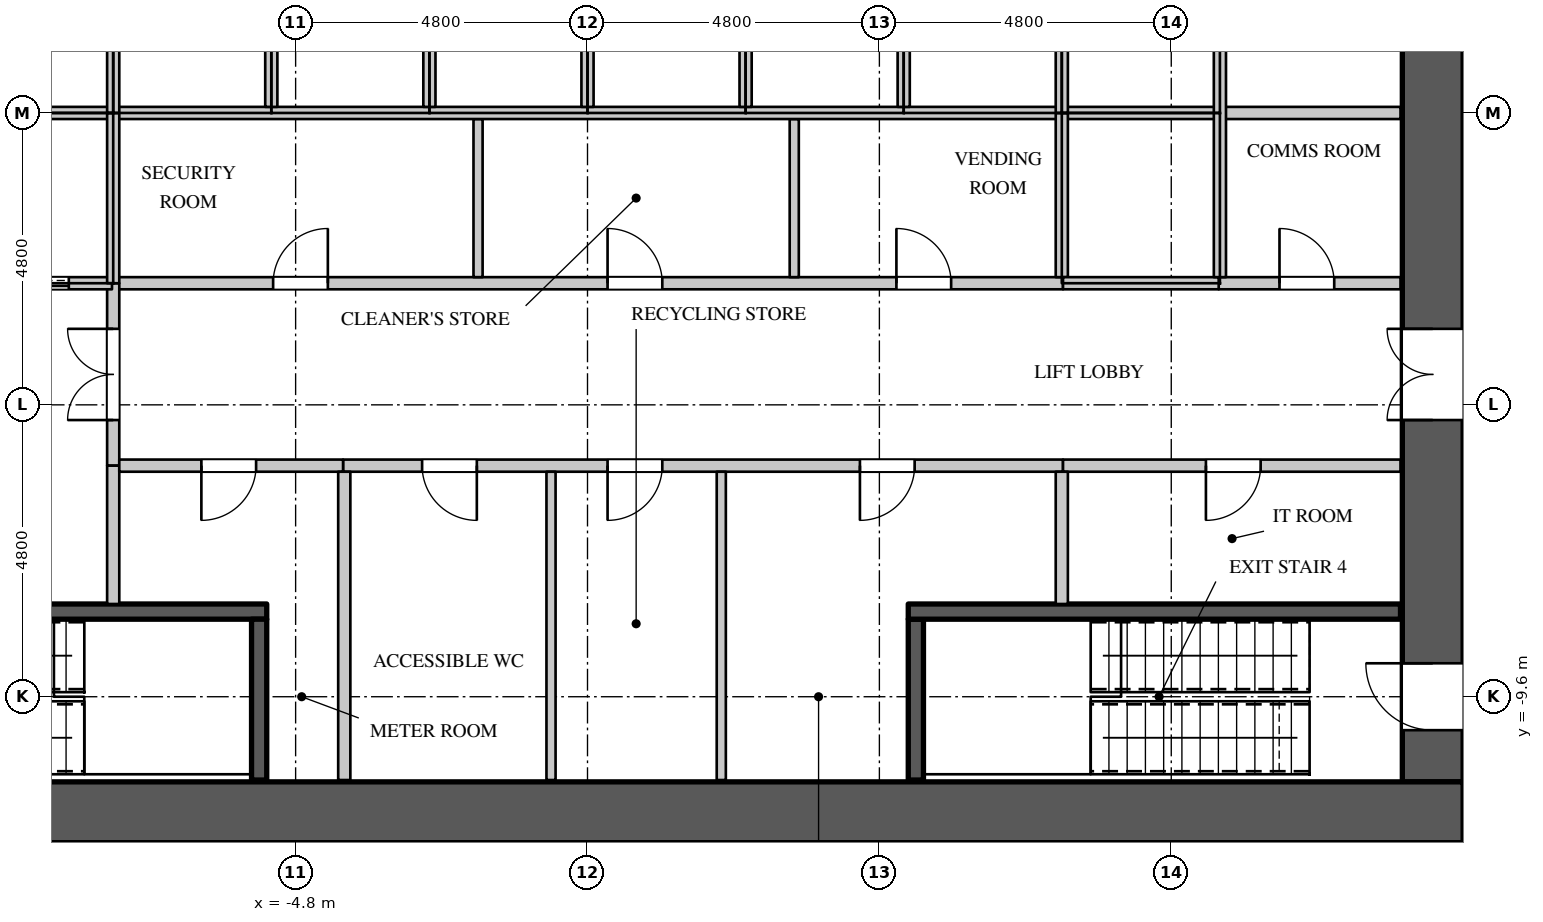
"""IFC4 building model, lengths in metres.
Left out: names, types, materials, properties, quantities, classifications, styles, units other than length and angle.
Written with IfcOpenShell. Run it as: python <this file> out.ifc"""

import sys

from ifc_helpers import new_model, si_unit, direction, frame, frame_2d, origin, place, context, subcontext, project, spatial, rectangle, extrude, element, fill, save


model = new_model("IFC4")
c1 = context("Model", 3, precision=1e-05, world=origin(), true_north=direction((0.0, 1.0)))
c2 = subcontext(c1, "Body", "Model", "MODEL_VIEW")
j1 = project(units=[si_unit("LENGTHUNIT", "METRE"), si_unit("PLANEANGLEUNIT", "RADIAN")], contexts=[c1])
p1 = place(None, origin())
s1 = spatial("IfcSite", under=j1, at=p1, CompositionType="ELEMENT")
p2 = place(p1, origin())
s2 = spatial("IfcBuilding", under=s1, at=p2, CompositionType="ELEMENT")
p3 = place(p2, frame((0.0, 0.0, 50.7)))
s3 = spatial("IfcBuildingStorey", under=s2, at=p3, CompositionType="ELEMENT", Elevation=50.7)
p4 = place(p3, frame((-14.4, -11.5, 0.0), z_axis=(0.0, 0.0, 1.0), x_axis=(1.0, 0.0, 0.0)))
e1 = element("IfcWall", 1, at=p4, inside=s3, PredefinedType="SHEAR", context=c2, shape_type="SweptSolid", body=[
    extrude(rectangle(XDim=28.8, YDim=1.0, at=frame_2d((14.4, 0.0))), origin(), (0.0, 0.0, 1.0), 4.2),
])
p5 = place(p3, frame((13.9, -11.0, 0.0), z_axis=(0.0, 0.0, 1.0), x_axis=(0.0, 1.0, 0.0)))
e2 = element("IfcWall", 2, at=p5, inside=s3, PredefinedType="SHEAR", context=c2, shape_type="SweptSolid", body=[
    extrude(rectangle(XDim=22.0, YDim=1.0, at=frame_2d((11.0, 0.0))), origin(), (0.0, 0.0, 1.0), 4.2),
])
p6 = place(p5, frame((20.05, 0.0, 0.0)))
e3 = element("IfcOpeningElement", 3, at=p6, cuts=e2, PredefinedType="OPENING", context=c2, shape_type="SweptSolid", body=[
    extrude(rectangle(XDim=1.1, YDim=2.2, at=frame_2d((0.55, 1.1))), frame((0.0, 0.51, 0.0), z_axis=(0.0, -1.0, 0.0), x_axis=(1.0, 0.0, 0.0)), (0.0, 0.0, 1.0), 1.02),
])
p7 = place(p5, frame((0.85, 0.0, 0.0)))
e4 = element("IfcOpeningElement", 4, at=p7, cuts=e2, PredefinedType="OPENING", context=c2, shape_type="SweptSolid", body=[
    extrude(rectangle(XDim=1.1, YDim=2.2, at=frame_2d((0.55, 1.1))), frame((0.0, 0.51, 0.0), z_axis=(0.0, -1.0, 0.0), x_axis=(1.0, 0.0, 0.0)), (0.0, 0.0, 1.0), 1.02),
])
p8 = place(p5, frame((14.55, 0.0, 0.0)))
e5 = element("IfcOpeningElement", 5, at=p8, cuts=e2, PredefinedType="OPENING", context=c2, shape_type="SweptSolid", body=[
    extrude(rectangle(XDim=1.5, YDim=2.4, at=frame_2d((0.75, 1.2))), frame((0.0, 0.51, 0.0), z_axis=(0.0, -1.0, 0.0), x_axis=(1.0, 0.0, 0.0)), (0.0, 0.0, 1.0), 1.02),
])
p9 = place(p5, frame((5.95, 0.0, 0.0)))
e6 = element("IfcOpeningElement", 6, at=p9, cuts=e2, PredefinedType="OPENING", context=c2, shape_type="SweptSolid", body=[
    extrude(rectangle(XDim=1.5, YDim=2.4, at=frame_2d((0.75, 1.2))), frame((0.0, 0.51, 0.0), z_axis=(0.0, -1.0, 0.0), x_axis=(1.0, 0.0, 0.0)), (0.0, 0.0, 1.0), 1.02),
])
p10 = place(p3, frame((-7.82, -2.8, 0.0), z_axis=(0.0, 0.0, 1.0), x_axis=(1.0, 0.0, 0.0)))
e7 = element("IfcWall", 7, at=p10, inside=s3, PredefinedType="PARTITIONING", context=c2, shape_type="SweptSolid", body=[
    extrude(rectangle(XDim=15.64, YDim=0.2, at=frame_2d((7.82, 0.0))), origin(), (0.0, 0.0, 1.0), 3.95),
])
p11 = place(p10, frame((2.65, 0.0, 0.0)))
e8 = element("IfcOpeningElement", 8, at=p11, cuts=e7, PredefinedType="OPENING", context=c2, shape_type="SweptSolid", body=[
    extrude(rectangle(XDim=0.9, YDim=2.2, at=frame_2d((0.45, 1.1))), frame((0.0, 0.11, 0.0), z_axis=(0.0, -1.0, 0.0), x_axis=(1.0, 0.0, 0.0)), (0.0, 0.0, 1.0), 0.22),
])
p12 = place(p10, frame((8.15, 0.0, 0.0)))
e9 = element("IfcOpeningElement", 9, at=p12, cuts=e7, PredefinedType="OPENING", context=c2, shape_type="SweptSolid", body=[
    extrude(rectangle(XDim=0.9, YDim=2.2, at=frame_2d((0.45, 1.1))), frame((0.0, 0.11, 0.0), z_axis=(0.0, -1.0, 0.0), x_axis=(1.0, 0.0, 0.0)), (0.0, 0.0, 1.0), 0.22),
])
p13 = place(p10, frame((12.9, 0.0, 0.0)))
e10 = element("IfcOpeningElement", 10, at=p13, cuts=e7, PredefinedType="OPENING", context=c2, shape_type="SweptSolid", body=[
    extrude(rectangle(XDim=0.9, YDim=2.2, at=frame_2d((0.45, 1.1))), frame((0.0, 0.11, 0.0), z_axis=(0.0, -1.0, 0.0), x_axis=(1.0, 0.0, 0.0)), (0.0, 0.0, 1.0), 0.22),
])
p14 = place(p3, frame((-7.8, -5.8, 0.0), z_axis=(0.0, 0.0, 1.0), x_axis=(0.0, 1.0, 0.0)))
e11 = element("IfcWall", 11, at=p14, inside=s3, PredefinedType="PARTITIONING", context=c2, shape_type="SweptSolid", body=[
    extrude(rectangle(XDim=3.0, YDim=0.2, at=frame_2d((1.5, 0.0))), origin(), (0.0, 0.0, 1.0), 3.95),
])
p15 = place(p14, frame((0.75, 0.0, 0.0)))
e12 = element("IfcOpeningElement", 12, at=p15, cuts=e11, PredefinedType="OPENING", context=c2, shape_type="SweptSolid", body=[
    extrude(rectangle(XDim=1.5, YDim=2.4, at=frame_2d((0.75, 1.2))), frame((0.0, 0.11, 0.0), z_axis=(0.0, -1.0, 0.0), x_axis=(1.0, 0.0, 0.0)), (0.0, 0.0, 1.0), 0.22),
])
p16 = place(p3, frame((-4.02, -5.8, 0.0), z_axis=(0.0, 0.0, 1.0), x_axis=(1.0, 0.0, 0.0)))
e13 = element("IfcWall", 13, at=p16, inside=s3, PredefinedType="PARTITIONING", context=c2, shape_type="SweptSolid", body=[
    extrude(rectangle(XDim=11.84, YDim=0.2, at=frame_2d((5.92, 0.0))), origin(), (0.0, 0.0, 1.0), 3.95),
])
p17 = place(p16, frame((1.3, 0.0, 0.0)))
e14 = element("IfcOpeningElement", 14, at=p17, cuts=e13, PredefinedType="OPENING", context=c2, shape_type="SweptSolid", body=[
    extrude(rectangle(XDim=0.9, YDim=2.2, at=frame_2d((0.45, 1.1))), frame((0.0, 0.11, 0.0), z_axis=(0.0, -1.0, 0.0), x_axis=(1.0, 0.0, 0.0)), (0.0, 0.0, 1.0), 0.22),
])
p18 = place(p16, frame((4.35, 0.0, 0.0)))
e15 = element("IfcOpeningElement", 15, at=p18, cuts=e13, PredefinedType="OPENING", context=c2, shape_type="SweptSolid", body=[
    extrude(rectangle(XDim=0.9, YDim=2.2, at=frame_2d((0.45, 1.1))), frame((0.0, 0.11, 0.0), z_axis=(0.0, -1.0, 0.0), x_axis=(1.0, 0.0, 0.0)), (0.0, 0.0, 1.0), 0.22),
])
p19 = place(p16, frame((8.5, 0.0, 0.0)))
e16 = element("IfcOpeningElement", 16, at=p19, cuts=e13, PredefinedType="OPENING", context=c2, shape_type="SweptSolid", body=[
    extrude(rectangle(XDim=0.9, YDim=2.2, at=frame_2d((0.45, 1.1))), frame((0.0, 0.11, 0.0), z_axis=(0.0, -1.0, 0.0), x_axis=(1.0, 0.0, 0.0)), (0.0, 0.0, 1.0), 0.22),
])
p20 = place(p3, frame((-1.8, -2.7, 0.0), z_axis=(0.0, 0.0, 1.0), x_axis=(0.0, 1.0, 0.0)))
e17 = element("IfcWall", 17, at=p20, inside=s3, PredefinedType="PARTITIONING", context=c2, shape_type="SweptSolid", body=[
    extrude(rectangle(XDim=2.6, YDim=0.15, at=frame_2d((1.3, 0.0))), origin(), (0.0, 0.0, 1.0), 3.95),
])
for number, where, z_axis, x_axis in (
    (18, (-0.6, -10.97, 0.0), (0.0, 0.0, 1.0), (0.0, 1.0, 0.0)),
    (19, (2.2, -10.97, 0.0), (0.0, 0.0, 1.0), (0.0, 1.0, 0.0)),
):
    element("IfcWall", number, at=place(p3, frame(where, z_axis=z_axis, x_axis=x_axis)), inside=s3, PredefinedType="PARTITIONING", context=c2, shape_type="SweptSolid", body=[
        extrude(rectangle(XDim=5.07, YDim=0.15, at=frame_2d((2.535, 0.0))), origin(), (0.0, 0.0, 1.0), 3.95),
    ])
p21 = place(p3, frame((3.4, -2.7, 0.0), z_axis=(0.0, 0.0, 1.0), x_axis=(0.0, 1.0, 0.0)))
e20 = element("IfcWall", 20, at=p21, inside=s3, PredefinedType="PARTITIONING", context=c2, shape_type="SweptSolid", body=[
    extrude(rectangle(XDim=2.6, YDim=0.15, at=frame_2d((1.3, 0.0))), origin(), (0.0, 0.0, 1.0), 3.95),
])
p22 = place(p3, frame((-7.8, -8.075, 0.0), z_axis=(0.0, 0.0, 1.0), x_axis=(0.0, 1.0, 0.0)))
e21 = element("IfcWall", 21, at=p22, inside=s3, PredefinedType="PARTITIONING", context=c2, shape_type="SweptSolid", body=[
    extrude(rectangle(XDim=2.275, YDim=0.2, at=frame_2d((1.137, 0.0))), origin(), (0.0, 0.0, 1.0), 3.95),
])
p23 = place(p3, frame((-7.7, -5.8, 0.0), z_axis=(0.0, 0.0, 1.0), x_axis=(1.0, 0.0, 0.0)))
e22 = element("IfcWall", 22, at=p23, inside=s3, PredefinedType="PARTITIONING", context=c2, shape_type="SweptSolid", body=[
    extrude(rectangle(XDim=3.68, YDim=0.2, at=frame_2d((1.84, 0.0))), origin(), (0.0, 0.0, 1.0), 3.95),
])
p24 = place(p23, frame((1.35, 0.0, 0.0)))
e23 = element("IfcOpeningElement", 23, at=p24, cuts=e22, PredefinedType="OPENING", context=c2, shape_type="SweptSolid", body=[
    extrude(rectangle(XDim=0.9, YDim=2.2, at=frame_2d((0.45, 1.1))), frame((0.0, 0.11, 0.0), z_axis=(0.0, -1.0, 0.0), x_axis=(1.0, 0.0, 0.0)), (0.0, 0.0, 1.0), 0.22),
])
p25 = place(p3, frame((-4.0, -10.97, 0.0), z_axis=(0.0, 0.0, 1.0), x_axis=(0.0, 1.0, 0.0)))
e24 = element("IfcWall", 24, at=p25, inside=s3, PredefinedType="PARTITIONING", context=c2, shape_type="SweptSolid", body=[
    extrude(rectangle(XDim=5.07, YDim=0.2, at=frame_2d((2.535, 0.0))), origin(), (0.0, 0.0, 1.0), 3.95),
])
p26 = place(p3, frame((7.82, -5.8, 0.0), z_axis=(0.0, 0.0, 1.0), x_axis=(1.0, 0.0, 0.0)))
e25 = element("IfcWall", 25, at=p26, inside=s3, PredefinedType="PARTITIONING", context=c2, shape_type="SweptSolid", body=[
    extrude(rectangle(XDim=5.55, YDim=0.2, at=frame_2d((2.775, 0.0))), origin(), (0.0, 0.0, 1.0), 3.95),
])
p27 = place(p26, frame((2.35, 0.0, 0.0)))
e26 = element("IfcOpeningElement", 26, at=p27, cuts=e25, PredefinedType="OPENING", context=c2, shape_type="SweptSolid", body=[
    extrude(rectangle(XDim=0.9, YDim=2.2, at=frame_2d((0.45, 1.1))), frame((0.0, 0.11, 0.0), z_axis=(0.0, -1.0, 0.0), x_axis=(1.0, 0.0, 0.0)), (0.0, 0.0, 1.0), 0.22),
])
p28 = place(p3, frame((7.8, -8.075, 0.0), z_axis=(0.0, 0.0, 1.0), x_axis=(0.0, 1.0, 0.0)))
e27 = element("IfcWall", 27, at=p28, inside=s3, PredefinedType="PARTITIONING", context=c2, shape_type="SweptSolid", body=[
    extrude(rectangle(XDim=2.175, YDim=0.2, at=frame_2d((1.087, 0.0))), origin(), (0.0, 0.0, 1.0), 3.95),
])
p29 = place(p3, frame((10.38, -2.8, 0.0), z_axis=(0.0, 0.0, 1.0), x_axis=(1.0, 0.0, 0.0)))
e28 = element("IfcWall", 28, at=p29, inside=s3, PredefinedType="PARTITIONING", context=c2, shape_type="SweptSolid", body=[
    extrude(rectangle(XDim=2.99, YDim=0.2, at=frame_2d((1.495, 0.0))), origin(), (0.0, 0.0, 1.0), 3.95),
])
p30 = place(p29, frame((1.0, 0.0, 0.0)))
e29 = element("IfcOpeningElement", 29, at=p30, cuts=e28, PredefinedType="OPENING", context=c2, shape_type="SweptSolid", body=[
    extrude(rectangle(XDim=0.9, YDim=2.2, at=frame_2d((0.45, 1.1))), frame((0.0, 0.11, 0.0), z_axis=(0.0, -1.0, 0.0), x_axis=(1.0, 0.0, 0.0)), (0.0, 0.0, 1.0), 0.22),
])
p31 = place(p3, frame((10.4, 0.0, 0.0), z_axis=(0.0, 0.0, 1.0), x_axis=(1.0, 0.0, 0.0)))
e30 = element("IfcWall", 30, at=p31, inside=s3, PredefinedType="PARTITIONING", context=c2, shape_type="SweptSolid", body=[
    extrude(rectangle(XDim=2.97, YDim=0.2, at=frame_2d((1.485, 0.0))), origin(), (0.0, 0.0, 1.0), 3.95),
])
p32 = place(p3, frame((-13.37, 0.0, 0.0), z_axis=(0.0, 0.0, 1.0), x_axis=(1.0, 0.0, 0.0)))
e31 = element("IfcWall", 31, at=p32, inside=s3, PredefinedType="PARTITIONING", context=c2, shape_type="SweptSolid", body=[
    extrude(rectangle(XDim=23.77, YDim=0.2, at=frame_2d((11.885, 0.0))), origin(), (0.0, 0.0, 1.0), 3.95),
])
p33 = place(p3, frame((-10.38, -2.8, 0.0), z_axis=(0.0, 0.0, 1.0), x_axis=(1.0, 0.0, 0.0)))
e32 = element("IfcWall", 32, at=p33, inside=s3, PredefinedType="PARTITIONING", context=c2, shape_type="SweptSolid", body=[
    extrude(rectangle(XDim=2.56, YDim=0.2, at=frame_2d((1.28, 0.0))), origin(), (0.0, 0.0, 1.0), 3.95),
])
p34 = place(p33, frame((0.75, 0.0, 0.0)))
e33 = element("IfcOpeningElement", 33, at=p34, cuts=e32, PredefinedType="OPENING", context=c2, shape_type="SweptSolid", body=[
    extrude(rectangle(XDim=1.1, YDim=2.2, at=frame_2d((0.55, 1.1))), frame((0.0, 0.11, 0.0), z_axis=(0.0, -1.0, 0.0), x_axis=(1.0, 0.0, 0.0)), (0.0, 0.0, 1.0), 0.22),
])
for number, where, z_axis, x_axis in (
    (34, (-7.8, -2.8, 0.0), (0.0, 0.0, 1.0), (0.0, 1.0, 0.0)),
    (35, (-7.8, 0.0, 0.0), (0.0, 0.0, 1.0), (0.0, 1.0, 0.0)),
):
    element("IfcWall", number, at=place(p3, frame(where, z_axis=z_axis, x_axis=x_axis)), inside=s3, PredefinedType="PARTITIONING", context=c2, shape_type="SweptSolid", body=[
        extrude(rectangle(XDim=2.8, YDim=0.2, at=frame_2d((1.4, 0.0))), origin(), (0.0, 0.0, 1.0), 3.95),
    ])
for number, where, z_axis, x_axis in (
    (36, (-5.2, 0.1, 0.0), (0.0, 0.0, 1.0), (0.0, 1.0, 0.0)),
    (37, (-2.6, 0.1, 0.0), (0.0, 0.0, 1.0), (0.0, 1.0, 0.0)),
    (38, (0.0, 0.1, 0.0), (0.0, 0.0, 1.0), (0.0, 1.0, 0.0)),
    (39, (2.6, 0.1, 0.0), (0.0, 0.0, 1.0), (0.0, 1.0, 0.0)),
    (40, (5.2, 0.1, 0.0), (0.0, 0.0, 1.0), (0.0, 1.0, 0.0)),
):
    element("IfcWall", number, at=place(p3, frame(where, z_axis=z_axis, x_axis=x_axis)), inside=s3, PredefinedType="PARTITIONING", context=c2, shape_type="SweptSolid", body=[
        extrude(rectangle(XDim=2.6, YDim=0.2, at=frame_2d((1.3, 0.0))), origin(), (0.0, 0.0, 1.0), 3.95),
    ])
p35 = place(p3, frame((7.8, -2.7, 0.0), z_axis=(0.0, 0.0, 1.0), x_axis=(0.0, 1.0, 0.0)))
e41 = element("IfcWall", 41, at=p35, inside=s3, PredefinedType="PARTITIONING", context=c2, shape_type="SweptSolid", body=[
    extrude(rectangle(XDim=2.7, YDim=0.2, at=frame_2d((1.35, 0.0))), origin(), (0.0, 0.0, 1.0), 3.95),
])
p36 = place(p3, frame((7.82, -2.8, 0.0), z_axis=(0.0, 0.0, 1.0), x_axis=(1.0, 0.0, 0.0)))
e42 = element("IfcWall", 42, at=p36, inside=s3, PredefinedType="PARTITIONING", context=c2, shape_type="SweptSolid", body=[
    extrude(rectangle(XDim=2.56, YDim=0.2, at=frame_2d((1.28, 0.0))), origin(), (0.0, 0.0, 1.0), 3.95),
])
p37 = place(p3, frame((7.8, 0.0, 0.0), z_axis=(0.0, 0.0, 1.0), x_axis=(0.0, 1.0, 0.0)))
e43 = element("IfcWall", 43, at=p37, inside=s3, PredefinedType="PARTITIONING", context=c2, shape_type="SweptSolid", body=[
    extrude(rectangle(XDim=2.7, YDim=0.2, at=frame_2d((1.35, 0.0))), origin(), (0.0, 0.0, 1.0), 3.95),
])
p38 = place(p3, frame((10.4, -2.7, 0.0), z_axis=(0.0, 0.0, 1.0), x_axis=(0.0, 1.0, 0.0)))
e44 = element("IfcWall", 44, at=p38, inside=s3, PredefinedType="PARTITIONING", context=c2, shape_type="SweptSolid", body=[
    extrude(rectangle(XDim=5.4, YDim=0.2, at=frame_2d((2.7, 0.0))), origin(), (0.0, 0.0, 1.0), 3.95),
])
p39 = place(p3, frame((-13.37, -8.2, 0.0), z_axis=(0.0, 0.0, 1.0), x_axis=(1.0, 0.0, 0.0)))
e45 = element("IfcWall", 45, at=p39, inside=s3, PredefinedType="SHEAR", context=c2, shape_type="SweptSolid", body=[
    extrude(rectangle(XDim=8.095, YDim=0.25, at=frame_2d((4.048, 0.0))), origin(), (0.0, 0.0, 1.0), 3.95),
])
p40 = place(p39, frame((0.15, 0.0, 0.0)))
e46 = element("IfcOpeningElement", 46, at=p40, cuts=e45, PredefinedType="OPENING", context=c2, shape_type="SweptSolid", body=[
    extrude(rectangle(XDim=1.1, YDim=2.2, at=frame_2d((0.55, 1.1))), frame((0.0, 0.135, 0.0), z_axis=(0.0, -1.0, 0.0), x_axis=(1.0, 0.0, 0.0)), (0.0, 0.0, 1.0), 0.27),
])
for number, where, z_axis, x_axis in (
    (47, (-5.4, -10.97, 0.0), (0.0, 0.0, 1.0), (0.0, 1.0, 0.0)),
    (48, (5.4, -10.97, 0.0), (0.0, 0.0, 1.0), (0.0, 1.0, 0.0)),
):
    element("IfcWall", number, at=place(p3, frame(where, z_axis=z_axis, x_axis=x_axis)), inside=s3, PredefinedType="SHEAR", context=c2, shape_type="SweptSolid", body=[
        extrude(rectangle(XDim=2.645, YDim=0.25, at=frame_2d((1.323, 0.0))), origin(), (0.0, 0.0, 1.0), 3.95),
    ])
p41 = place(p3, frame((5.275, -8.2, 0.0), z_axis=(0.0, 0.0, 1.0), x_axis=(1.0, 0.0, 0.0)))
e49 = element("IfcWall", 49, at=p41, inside=s3, PredefinedType="SHEAR", context=c2, shape_type="SweptSolid", body=[
    extrude(rectangle(XDim=8.095, YDim=0.25, at=frame_2d((4.048, 0.0))), origin(), (0.0, 0.0, 1.0), 3.95),
])
p42 = place(p30, origin())
e50 = element("IfcDoor", 50, at=p42, inside=s3, OperationType="SINGLE_SWING_LEFT", PredefinedType="DOOR", context=c2, shape_type="SweptSolid", body=[
    extrude(rectangle(XDim=0.9, YDim=2.2, at=frame_2d((0.45, 1.1))), frame((0.0, 0.025, 0.0), z_axis=(0.0, -1.0, 0.0), x_axis=(1.0, 0.0, 0.0)), (0.0, 0.0, 1.0), 0.05),
])
fill(e29, e50)
p43 = place(p24, origin())
e51 = element("IfcDoor", 51, at=p43, inside=s3, OperationType="SINGLE_SWING_RIGHT", PredefinedType="DOOR", context=c2, shape_type="SweptSolid", body=[
    extrude(rectangle(XDim=0.9, YDim=2.2, at=frame_2d((0.45, 1.1))), frame((0.0, 0.025, 0.0), z_axis=(0.0, -1.0, 0.0), x_axis=(1.0, 0.0, 0.0)), (0.0, 0.0, 1.0), 0.05),
])
fill(e23, e51)
p44 = place(p17, origin())
e52 = element("IfcDoor", 52, at=p44, inside=s3, OperationType="SINGLE_SWING_LEFT", PredefinedType="DOOR", context=c2, shape_type="SweptSolid", body=[
    extrude(rectangle(XDim=0.9, YDim=2.2, at=frame_2d((0.45, 1.1))), frame((0.0, 0.025, 0.0), z_axis=(0.0, -1.0, 0.0), x_axis=(1.0, 0.0, 0.0)), (0.0, 0.0, 1.0), 0.05),
])
fill(e14, e52)
p45 = place(p18, origin())
e53 = element("IfcDoor", 53, at=p45, inside=s3, OperationType="SINGLE_SWING_RIGHT", PredefinedType="DOOR", context=c2, shape_type="SweptSolid", body=[
    extrude(rectangle(XDim=0.9, YDim=2.2, at=frame_2d((0.45, 1.1))), frame((0.0, 0.025, 0.0), z_axis=(0.0, -1.0, 0.0), x_axis=(1.0, 0.0, 0.0)), (0.0, 0.0, 1.0), 0.05),
])
fill(e15, e53)
p46 = place(p19, origin())
e54 = element("IfcDoor", 54, at=p46, inside=s3, OperationType="SINGLE_SWING_RIGHT", PredefinedType="DOOR", context=c2, shape_type="SweptSolid", body=[
    extrude(rectangle(XDim=0.9, YDim=2.2, at=frame_2d((0.45, 1.1))), frame((0.0, 0.025, 0.0), z_axis=(0.0, -1.0, 0.0), x_axis=(1.0, 0.0, 0.0)), (0.0, 0.0, 1.0), 0.05),
])
fill(e16, e54)
p47 = place(p27, origin())
e55 = element("IfcDoor", 55, at=p47, inside=s3, OperationType="SINGLE_SWING_RIGHT", PredefinedType="DOOR", context=c2, shape_type="SweptSolid", body=[
    extrude(rectangle(XDim=0.9, YDim=2.2, at=frame_2d((0.45, 1.1))), frame((0.0, 0.025, 0.0), z_axis=(0.0, -1.0, 0.0), x_axis=(1.0, 0.0, 0.0)), (0.0, 0.0, 1.0), 0.05),
])
fill(e26, e55)
p48 = place(p11, origin())
e56 = element("IfcDoor", 56, at=p48, inside=s3, OperationType="SINGLE_SWING_RIGHT", PredefinedType="DOOR", context=c2, shape_type="SweptSolid", body=[
    extrude(rectangle(XDim=0.9, YDim=2.2, at=frame_2d((0.45, 1.1))), frame((0.0, 0.025, 0.0), z_axis=(0.0, -1.0, 0.0), x_axis=(1.0, 0.0, 0.0)), (0.0, 0.0, 1.0), 0.05),
])
fill(e8, e56)
p49 = place(p12, origin())
e57 = element("IfcDoor", 57, at=p49, inside=s3, OperationType="SINGLE_SWING_LEFT", PredefinedType="DOOR", context=c2, shape_type="SweptSolid", body=[
    extrude(rectangle(XDim=0.9, YDim=2.2, at=frame_2d((0.45, 1.1))), frame((0.0, 0.025, 0.0), z_axis=(0.0, -1.0, 0.0), x_axis=(1.0, 0.0, 0.0)), (0.0, 0.0, 1.0), 0.05),
])
fill(e9, e57)
p50 = place(p13, origin())
e58 = element("IfcDoor", 58, at=p50, inside=s3, OperationType="SINGLE_SWING_LEFT", PredefinedType="DOOR", context=c2, shape_type="SweptSolid", body=[
    extrude(rectangle(XDim=0.9, YDim=2.2, at=frame_2d((0.45, 1.1))), frame((0.0, 0.025, 0.0), z_axis=(0.0, -1.0, 0.0), x_axis=(1.0, 0.0, 0.0)), (0.0, 0.0, 1.0), 0.05),
])
fill(e10, e58)
p51 = place(p34, origin())
e59 = element("IfcDoor", 59, at=p51, inside=s3, OperationType="DOUBLE_DOOR_SLIDING", PredefinedType="DOOR", context=c2, shape_type="SweptSolid", body=[
    extrude(rectangle(XDim=1.1, YDim=2.2, at=frame_2d((0.55, 1.1))), frame((0.0, 0.025, 0.0), z_axis=(0.0, -1.0, 0.0), x_axis=(1.0, 0.0, 0.0)), (0.0, 0.0, 1.0), 0.05),
])
fill(e33, e59)
p52 = place(p15, origin())
e60 = element("IfcDoor", 60, at=p52, inside=s3, OperationType="DOUBLE_DOOR_SINGLE_SWING", PredefinedType="DOOR", context=c2, shape_type="SweptSolid", body=[
    extrude(rectangle(XDim=1.5, YDim=2.4, at=frame_2d((0.75, 1.2))), frame((0.0, 0.025, 0.0), z_axis=(0.0, -1.0, 0.0), x_axis=(1.0, 0.0, 0.0)), (0.0, 0.0, 1.0), 0.05),
])
fill(e12, e60)
p53 = place(p7, origin())
e61 = element("IfcDoor", 61, at=p53, inside=s3, OperationType="SINGLE_SWING_RIGHT", PredefinedType="DOOR", context=c2, shape_type="SweptSolid", body=[
    extrude(rectangle(XDim=1.1, YDim=2.2, at=frame_2d((0.55, 1.1))), frame((0.0, 0.495, 0.0), z_axis=(0.0, -1.0, 0.0), x_axis=(1.0, 0.0, 0.0)), (0.0, 0.0, 1.0), 0.05),
])
fill(e4, e61)
p54 = place(p9, origin())
e62 = element("IfcDoor", 62, at=p54, inside=s3, OperationType="DOUBLE_DOOR_SINGLE_SWING", PredefinedType="DOOR", context=c2, shape_type="SweptSolid", body=[
    extrude(rectangle(XDim=1.5, YDim=2.4, at=frame_2d((0.75, 1.2))), frame((0.0, 0.495, 0.0), z_axis=(0.0, -1.0, 0.0), x_axis=(1.0, 0.0, 0.0)), (0.0, 0.0, 1.0), 0.05),
])
fill(e6, e62)
save(model, sys.argv[1])
